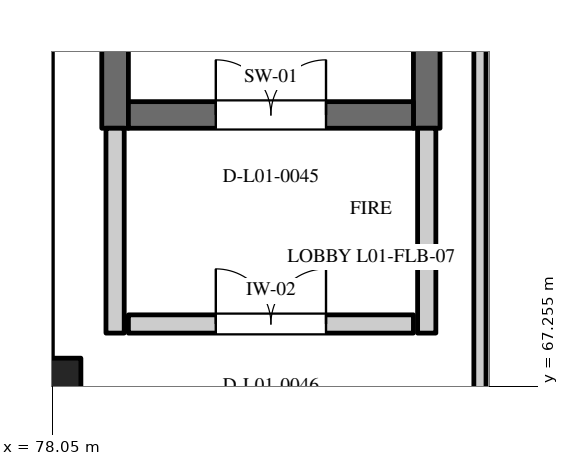
"""IFC4 building model, lengths in metres.
Left out: names, types, materials, properties, quantities, classifications, styles, units other than length and angle.
Written with IfcOpenShell. Run it as: python <this file> out.ifc"""

import sys

from ifc_helpers import new_model, si_unit, direction, frame, frame_2d, origin, origin_2d, place, context, subcontext, project, spatial, rectangle, extrude, element, fill, save


model = new_model("IFC4")
c1 = context("Model", 3, precision=1e-05, world=origin(), true_north=direction((0.0, 1.0)))
c2 = subcontext(c1, "Body", "Model", "MODEL_VIEW")
j1 = project(units=[si_unit("LENGTHUNIT", "METRE"), si_unit("PLANEANGLEUNIT", "RADIAN")], contexts=[c1])
p1 = place(None, origin())
s1 = spatial("IfcSite", under=j1, at=p1, CompositionType="ELEMENT")
p2 = place(p1, origin())
s2 = spatial("IfcBuilding", under=s1, at=p2, CompositionType="ELEMENT")
p3 = place(p2, frame((0.0, 0.0, 4.8)))
s3 = spatial("IfcBuildingStorey", under=s2, at=p3, CompositionType="ELEMENT", Elevation=4.8)
p4 = place(p3, frame((78.0, 67.2, 0.0), z_axis=(0.0, 0.0, 1.0), x_axis=(1.0, 0.0, 0.0)))
e1 = element("IfcColumn", 1, at=p4, inside=s3, PredefinedType="COLUMN", context=c2, shape_type="SweptSolid", body=[
    extrude(rectangle(XDim=0.85, YDim=0.85, at=origin_2d()), origin(), (0.0, 0.0, 1.0), 4.8),
])
for number, where, z_axis, x_axis in (
    (2, (78.875, 70.65, 0.0), (0.0, 0.0, 1.0), (0.0, 1.0, 0.0)),
    (3, (82.975, 70.65, 0.0), (0.0, 0.0, 1.0), (0.0, 1.0, 0.0)),
):
    element("IfcWall", number, at=place(p3, frame(where, z_axis=z_axis, x_axis=x_axis)), inside=s3, PredefinedType="SHEAR", context=c2, shape_type="SweptSolid", body=[
        extrude(rectangle(XDim=10.5, YDim=0.35, at=frame_2d((5.25, 0.0))), origin(), (0.0, 0.0, 1.0), 4.8),
    ])
p5 = place(p3, frame((79.05, 70.825, 0.0), z_axis=(0.0, 0.0, 1.0), x_axis=(1.0, 0.0, 0.0)))
e4 = element("IfcWall", 4, at=p5, inside=s3, PredefinedType="SHEAR", context=c2, shape_type="SweptSolid", body=[
    extrude(rectangle(XDim=3.75, YDim=0.35, at=frame_2d((1.875, 0.0))), origin(), (0.0, 0.0, 1.0), 4.45),
])
p6 = place(p5, frame((1.15, 0.0, 0.0)))
e5 = element("IfcOpeningElement", 5, at=p6, cuts=e4, PredefinedType="OPENING", context=c2, shape_type="SweptSolid", body=[
    extrude(rectangle(XDim=1.45, YDim=2.2, at=frame_2d((0.725, 1.1))), frame((0.0, 0.187, 0.0), z_axis=(0.0, -1.0, 0.0), x_axis=(1.0, 0.0, 0.0)), (0.0, 0.0, 1.0), 0.374),
])
for number, where, z_axis, x_axis in (
    (6, (78.875, 67.955, 0.0), (0.0, 0.0, 1.0), (0.0, 1.0, 0.0)),
    (7, (82.975, 67.955, 0.0), (0.0, 0.0, 1.0), (0.0, 1.0, 0.0)),
):
    element("IfcWall", number, at=place(p3, frame(where, z_axis=z_axis, x_axis=x_axis)), inside=s3, PredefinedType="STANDARD", context=c2, shape_type="SweptSolid", body=[
        extrude(rectangle(XDim=2.695, YDim=0.24, at=frame_2d((1.347, 0.0))), origin(), (0.0, 0.0, 1.0), 4.45),
    ])
p7 = place(p3, frame((79.05, 68.075, 0.0), z_axis=(0.0, 0.0, 1.0), x_axis=(1.0, 0.0, 0.0)))
e8 = element("IfcWall", 8, at=p7, inside=s3, PredefinedType="STANDARD", context=c2, shape_type="SweptSolid", body=[
    extrude(rectangle(XDim=3.75, YDim=0.24, at=frame_2d((1.875, 0.0))), origin(), (0.0, 0.0, 1.0), 4.45),
])
p8 = place(p7, frame((1.15, 0.0, 0.0)))
e9 = element("IfcOpeningElement", 9, at=p8, cuts=e8, PredefinedType="OPENING", context=c2, shape_type="SweptSolid", body=[
    extrude(rectangle(XDim=1.45, YDim=2.2, at=frame_2d((0.725, 1.1))), frame((0.0, 0.132, 0.0), z_axis=(0.0, -1.0, 0.0), x_axis=(1.0, 0.0, 0.0)), (0.0, 0.0, 1.0), 0.264),
])
p9 = place(p3, frame((83.675, 54.085, 0.0), z_axis=(0.0, 0.0, 1.0), x_axis=(0.0, 1.0, 0.0)))
e10 = element("IfcWall", 10, at=p9, inside=s3, PredefinedType="PARTITIONING", context=c2, shape_type="SweptSolid", body=[
    extrude(rectangle(XDim=29.83, YDim=0.16, at=frame_2d((14.915, 0.0))), origin(), (0.0, 0.0, 1.0), 4.43),
])
p10 = place(p6, origin())
e11 = element("IfcDoor", 11, at=p10, inside=s3, OperationType="DOUBLE_DOOR_SINGLE_SWING", PredefinedType="DOOR", context=c2, shape_type="SweptSolid", body=[
    extrude(rectangle(XDim=1.45, YDim=2.2, at=frame_2d((0.725, 1.1))), frame((0.0, 0.025, 0.0), z_axis=(0.0, -1.0, 0.0), x_axis=(1.0, 0.0, 0.0)), (0.0, 0.0, 1.0), 0.05),
])
fill(e5, e11)
p11 = place(p8, origin())
e12 = element("IfcDoor", 12, at=p11, inside=s3, OperationType="DOUBLE_DOOR_SINGLE_SWING", PredefinedType="DOOR", context=c2, shape_type="SweptSolid", body=[
    extrude(rectangle(XDim=1.45, YDim=2.2, at=frame_2d((0.725, 1.1))), frame((0.0, 0.025, 0.0), z_axis=(0.0, -1.0, 0.0), x_axis=(1.0, 0.0, 0.0)), (0.0, 0.0, 1.0), 0.05),
])
fill(e9, e12)
save(model, sys.argv[1])
